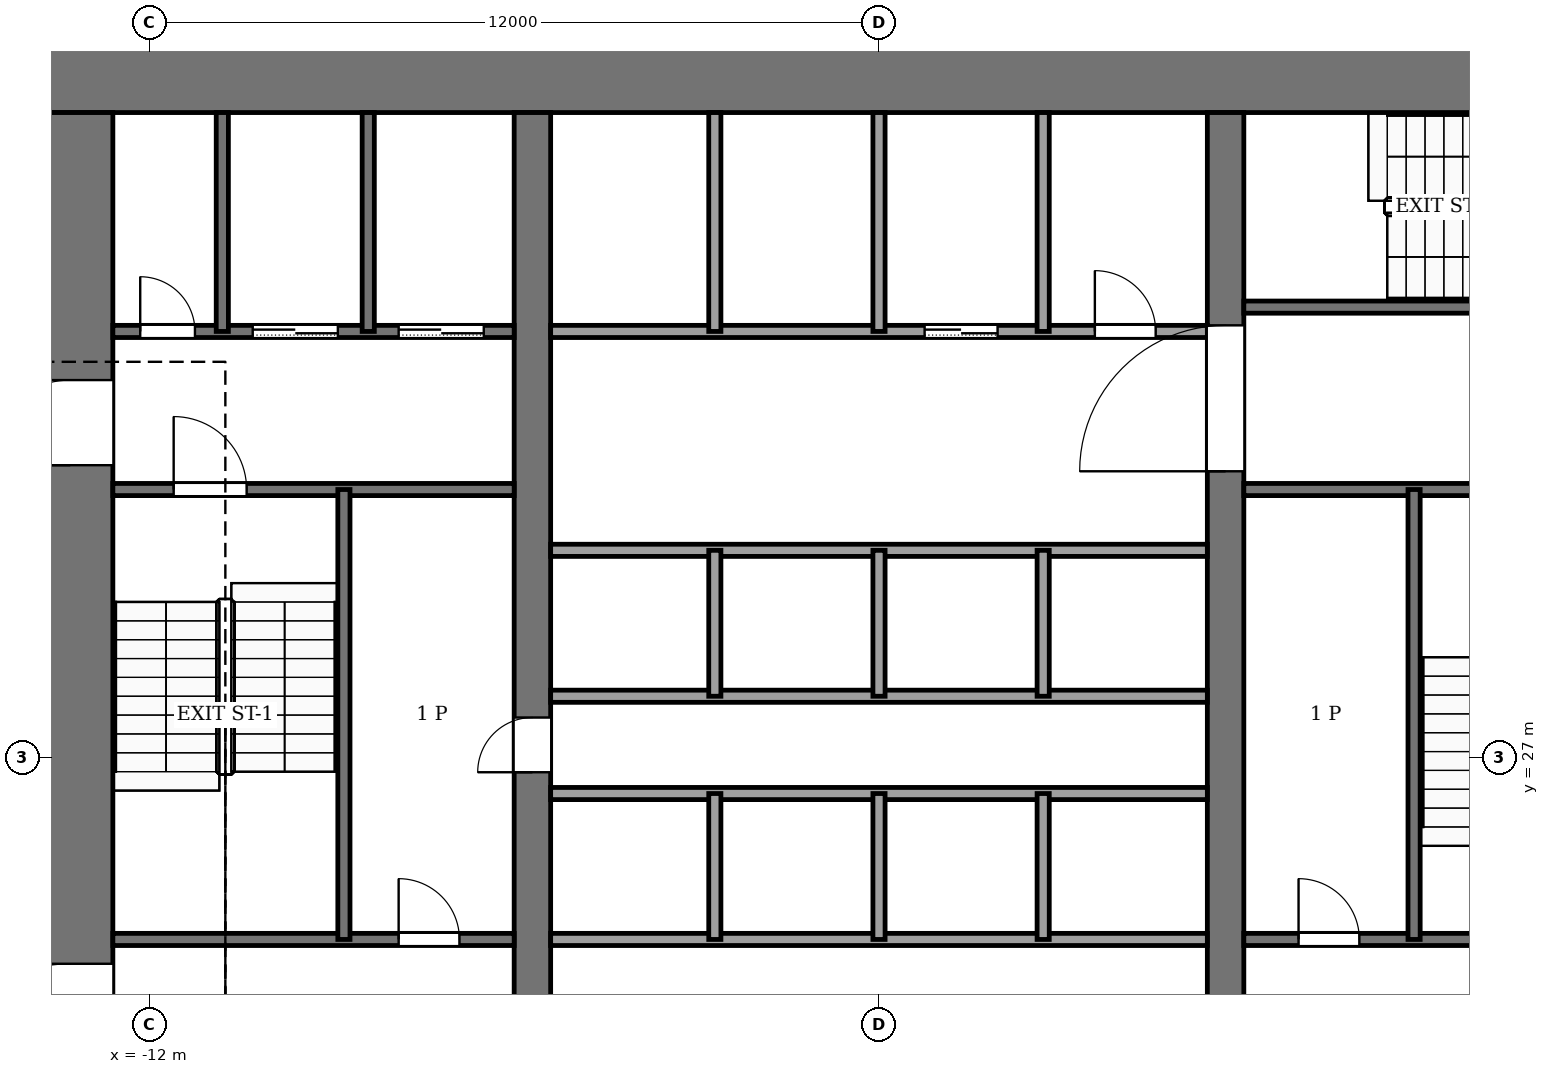
"""IFC4 building model, lengths in metres.
Left out: names, types, materials, properties, quantities, classifications, styles, units other than length and angle.
Written with IfcOpenShell. Run it as: python <this file> out.ifc"""

import sys

from ifc_helpers import new_model, si_unit, direction, frame, frame_2d, origin, place, context, subcontext, project, spatial, rectangle, extrude, element, fill, save


model = new_model("IFC4")
c1 = context("Model", 3, precision=1e-05, world=origin(), true_north=direction((0.0, 1.0)))
c2 = subcontext(c1, "Body", "Model", "MODEL_VIEW")
j1 = project(units=[si_unit("LENGTHUNIT", "METRE"), si_unit("PLANEANGLEUNIT", "RADIAN")], contexts=[c1])
p1 = place(None, origin())
s1 = spatial("IfcSite", under=j1, at=p1, CompositionType="ELEMENT")
p2 = place(p1, origin())
s2 = spatial("IfcBuilding", under=s1, at=p2, CompositionType="ELEMENT")
p3 = place(p2, frame((0.0, 0.0, 58.0)))
s3 = spatial("IfcBuildingStorey", under=s2, at=p3, CompositionType="ELEMENT", Elevation=58.0)
p4 = place(p3, frame((-14.0, 38.3, -0.25), z_axis=(0.0, 0.0, 1.0), x_axis=(1.0, 0.0, 0.0)))
e1 = element("IfcWall", 1, at=p4, inside=s3, PredefinedType="SHEAR", context=c2, shape_type="SweptSolid", body=[
    extrude(rectangle(XDim=28.0, YDim=1.4, at=frame_2d((14.0, 0.0))), origin(), (0.0, 0.0, 1.0), 7.12),
])
p5 = place(p3, frame((-13.3, 18.4, -0.25), z_axis=(0.0, 0.0, 1.0), x_axis=(0.0, 1.0, 0.0)))
e2 = element("IfcWall", 2, at=p5, inside=s3, PredefinedType="SHEAR", context=c2, shape_type="SweptSolid", body=[
    extrude(rectangle(XDim=19.2, YDim=1.4, at=frame_2d((9.6, 0.0))), origin(), (0.0, 0.0, 1.0), 7.12),
])
p6 = place(p5, frame((2.8, 0.0, 0.25)))
e3 = element("IfcOpeningElement", 3, at=p6, cuts=e2, PredefinedType="OPENING", context=c2, shape_type="SweptSolid", body=[
    extrude(rectangle(XDim=2.4, YDim=2.4, at=frame_2d((1.2, 1.2))), frame((0.0, 0.71, 0.0), z_axis=(0.0, -1.0, 0.0), x_axis=(1.0, 0.0, 0.0)), (0.0, 0.0, 1.0), 1.42),
])
p7 = place(p5, frame((13.4, 0.0, 0.25)))
e4 = element("IfcOpeningElement", 4, at=p7, cuts=e2, PredefinedType="OPENING", context=c2, shape_type="SweptSolid", body=[
    extrude(rectangle(XDim=1.4, YDim=2.2, at=frame_2d((0.7, 1.1))), frame((0.0, 0.71, 0.0), z_axis=(0.0, -1.0, 0.0), x_axis=(1.0, 0.0, 0.0)), (0.0, 0.0, 1.0), 1.42),
])
p8 = place(p3, frame((-5.7, 18.4, -0.25), z_axis=(0.0, 0.0, 1.0), x_axis=(0.0, 1.0, 0.0)))
e5 = element("IfcWall", 5, at=p8, inside=s3, PredefinedType="SHEAR", context=c2, shape_type="SweptSolid", body=[
    extrude(rectangle(XDim=19.2, YDim=0.6, at=frame_2d((9.6, 0.0))), origin(), (0.0, 0.0, 1.0), 7.12),
])
p9 = place(p8, frame((8.35, 0.0, 0.25)))
e6 = element("IfcOpeningElement", 6, at=p9, cuts=e5, PredefinedType="OPENING", context=c2, shape_type="SweptSolid", body=[
    extrude(rectangle(XDim=0.9, YDim=2.1, at=frame_2d((0.45, 1.05))), frame((0.0, 0.31, 0.0), z_axis=(0.0, -1.0, 0.0), x_axis=(1.0, 0.0, 0.0)), (0.0, 0.0, 1.0), 0.62),
])
p10 = place(p3, frame((5.7, 18.4, -0.25), z_axis=(0.0, 0.0, 1.0), x_axis=(0.0, 1.0, 0.0)))
e7 = element("IfcWall", 7, at=p10, inside=s3, PredefinedType="SHEAR", context=c2, shape_type="SweptSolid", body=[
    extrude(rectangle(XDim=19.2, YDim=0.6, at=frame_2d((9.6, 0.0))), origin(), (0.0, 0.0, 1.0), 7.12),
])
p11 = place(p10, frame((13.3, 0.0, 0.25)))
e8 = element("IfcOpeningElement", 8, at=p11, cuts=e7, PredefinedType="OPENING", context=c2, shape_type="SweptSolid", body=[
    extrude(rectangle(XDim=2.4, YDim=2.4, at=frame_2d((1.2, 1.2))), frame((0.0, 0.31, 0.0), z_axis=(0.0, -1.0, 0.0), x_axis=(1.0, 0.0, 0.0)), (0.0, 0.0, 1.0), 0.62),
])
p12 = place(p3, frame((-12.6, 24.0, 0.0), z_axis=(0.0, 0.0, 1.0), x_axis=(1.0, 0.0, 0.0)))
e9 = element("IfcWall", 9, at=p12, inside=s3, PredefinedType="PARTITIONING", context=c2, shape_type="SweptSolid", body=[
    extrude(rectangle(XDim=6.6, YDim=0.2, at=frame_2d((3.3, 0.0))), origin(), (0.0, 0.0, 1.0), 6.87),
])
p13 = place(p12, frame((4.7, 0.0, 0.0)))
e10 = element("IfcOpeningElement", 10, at=p13, cuts=e9, PredefinedType="OPENING", context=c2, shape_type="SweptSolid", body=[
    extrude(rectangle(XDim=1.0, YDim=2.1, at=frame_2d((0.5, 1.05))), frame((0.0, 0.11, 0.0), z_axis=(0.0, -1.0, 0.0), x_axis=(1.0, 0.0, 0.0)), (0.0, 0.0, 1.0), 0.22),
])
p14 = place(p3, frame((-5.4, 24.0, 0.0), z_axis=(0.0, 0.0, 1.0), x_axis=(1.0, 0.0, 0.0)))
e11 = element("IfcWall", 11, at=p14, inside=s3, PredefinedType="PARTITIONING", context=c2, shape_type="SweptSolid", body=[
    extrude(rectangle(XDim=10.8, YDim=0.2, at=frame_2d((5.4, 0.0))), origin(), (0.0, 0.0, 1.0), 6.87),
])
p15 = place(p3, frame((6.0, 24.0, 0.0), z_axis=(0.0, 0.0, 1.0), x_axis=(1.0, 0.0, 0.0)))
e12 = element("IfcWall", 12, at=p15, inside=s3, PredefinedType="PARTITIONING", context=c2, shape_type="SweptSolid", body=[
    extrude(rectangle(XDim=6.6, YDim=0.2, at=frame_2d((3.3, 0.0))), origin(), (0.0, 0.0, 1.0), 6.87),
])
p16 = place(p15, frame((0.9, 0.0, 0.0)))
e13 = element("IfcOpeningElement", 13, at=p16, cuts=e12, PredefinedType="OPENING", context=c2, shape_type="SweptSolid", body=[
    extrude(rectangle(XDim=1.0, YDim=2.1, at=frame_2d((0.5, 1.05))), frame((0.0, 0.11, 0.0), z_axis=(0.0, -1.0, 0.0), x_axis=(1.0, 0.0, 0.0)), (0.0, 0.0, 1.0), 0.22),
])
p17 = place(p15, frame((4.4, 0.0, 0.0)))
e14 = element("IfcOpeningElement", 14, at=p17, cuts=e12, PredefinedType="OPENING", context=c2, shape_type="SweptSolid", body=[
    extrude(rectangle(XDim=1.2, YDim=2.2, at=frame_2d((0.6, 1.1))), frame((0.0, 0.11, 0.0), z_axis=(0.0, -1.0, 0.0), x_axis=(1.0, 0.0, 0.0)), (0.0, 0.0, 1.0), 0.22),
])
for number, where, z_axis, x_axis in (
    (15, (-5.4, 26.4, 0.0), (0.0, 0.0, 1.0), (1.0, 0.0, 0.0)),
    (16, (-5.4, 28.0, 0.0), (0.0, 0.0, 1.0), (1.0, 0.0, 0.0)),
    (17, (-5.4, 30.4, 0.0), (0.0, 0.0, 1.0), (1.0, 0.0, 0.0)),
):
    element("IfcWall", number, at=place(p3, frame(where, z_axis=z_axis, x_axis=x_axis)), inside=s3, PredefinedType="PARTITIONING", context=c2, shape_type="SweptSolid", body=[
        extrude(rectangle(XDim=10.8, YDim=0.2, at=frame_2d((5.4, 0.0))), origin(), (0.0, 0.0, 1.0), 6.87),
    ])
p18 = place(p3, frame((-12.6, 31.4, 0.0), z_axis=(0.0, 0.0, 1.0), x_axis=(1.0, 0.0, 0.0)))
e18 = element("IfcWall", 18, at=p18, inside=s3, PredefinedType="PARTITIONING", context=c2, shape_type="SweptSolid", body=[
    extrude(rectangle(XDim=6.6, YDim=0.2, at=frame_2d((3.3, 0.0))), origin(), (0.0, 0.0, 1.0), 6.87),
])
p19 = place(p18, frame((1.0, 0.0, 0.0)))
e19 = element("IfcOpeningElement", 19, at=p19, cuts=e18, PredefinedType="OPENING", context=c2, shape_type="SweptSolid", body=[
    extrude(rectangle(XDim=1.2, YDim=2.2, at=frame_2d((0.6, 1.1))), frame((0.0, 0.11, 0.0), z_axis=(0.0, -1.0, 0.0), x_axis=(1.0, 0.0, 0.0)), (0.0, 0.0, 1.0), 0.22),
])
p20 = place(p3, frame((6.0, 31.4, 0.0), z_axis=(0.0, 0.0, 1.0), x_axis=(1.0, 0.0, 0.0)))
e20 = element("IfcWall", 20, at=p20, inside=s3, PredefinedType="PARTITIONING", context=c2, shape_type="SweptSolid", body=[
    extrude(rectangle(XDim=6.6, YDim=0.2, at=frame_2d((3.3, 0.0))), origin(), (0.0, 0.0, 1.0), 6.87),
])
p21 = place(p3, frame((-12.6, 34.0, 0.0), z_axis=(0.0, 0.0, 1.0), x_axis=(1.0, 0.0, 0.0)))
e21 = element("IfcWall", 21, at=p21, inside=s3, PredefinedType="PARTITIONING", context=c2, shape_type="SweptSolid", body=[
    extrude(rectangle(XDim=6.6, YDim=0.2, at=frame_2d((3.3, 0.0))), origin(), (0.0, 0.0, 1.0), 6.87),
])
p22 = place(p21, frame((4.7, 0.0, 0.0)))
e22 = element("IfcOpeningElement", 22, at=p22, cuts=e21, PredefinedType="OPENING", context=c2, shape_type="SweptSolid", body=[
    extrude(rectangle(XDim=1.4, YDim=2.2, at=frame_2d((0.7, 1.1))), frame((0.0, 0.11, 0.0), z_axis=(0.0, -1.0, 0.0), x_axis=(1.0, 0.0, 0.0)), (0.0, 0.0, 1.0), 0.22),
])
p23 = place(p21, frame((2.3, 0.0, 0.0)))
e23 = element("IfcOpeningElement", 23, at=p23, cuts=e21, PredefinedType="OPENING", context=c2, shape_type="SweptSolid", body=[
    extrude(rectangle(XDim=1.4, YDim=2.2, at=frame_2d((0.7, 1.1))), frame((0.0, 0.11, 0.0), z_axis=(0.0, -1.0, 0.0), x_axis=(1.0, 0.0, 0.0)), (0.0, 0.0, 1.0), 0.22),
])
p24 = place(p21, frame((0.45, 0.0, 0.0)))
e24 = element("IfcOpeningElement", 24, at=p24, cuts=e21, PredefinedType="OPENING", context=c2, shape_type="SweptSolid", body=[
    extrude(rectangle(XDim=0.9, YDim=2.1, at=frame_2d((0.45, 1.05))), frame((0.0, 0.11, 0.0), z_axis=(0.0, -1.0, 0.0), x_axis=(1.0, 0.0, 0.0)), (0.0, 0.0, 1.0), 0.22),
])
p25 = place(p3, frame((-5.4, 34.0, 0.0), z_axis=(0.0, 0.0, 1.0), x_axis=(1.0, 0.0, 0.0)))
e25 = element("IfcWall", 25, at=p25, inside=s3, PredefinedType="PARTITIONING", context=c2, shape_type="SweptSolid", body=[
    extrude(rectangle(XDim=10.8, YDim=0.2, at=frame_2d((5.4, 0.0))), origin(), (0.0, 0.0, 1.0), 6.87),
])
p26 = place(p25, frame((6.15, 0.0, 0.0)))
e26 = element("IfcOpeningElement", 26, at=p26, cuts=e25, PredefinedType="OPENING", context=c2, shape_type="SweptSolid", body=[
    extrude(rectangle(XDim=1.2, YDim=2.2, at=frame_2d((0.6, 1.1))), frame((0.0, 0.11, 0.0), z_axis=(0.0, -1.0, 0.0), x_axis=(1.0, 0.0, 0.0)), (0.0, 0.0, 1.0), 0.22),
])
p27 = place(p25, frame((8.95, 0.0, 0.0)))
e27 = element("IfcOpeningElement", 27, at=p27, cuts=e25, PredefinedType="OPENING", context=c2, shape_type="SweptSolid", body=[
    extrude(rectangle(XDim=1.0, YDim=2.1, at=frame_2d((0.5, 1.05))), frame((0.0, 0.11, 0.0), z_axis=(0.0, -1.0, 0.0), x_axis=(1.0, 0.0, 0.0)), (0.0, 0.0, 1.0), 0.22),
])
p28 = place(p3, frame((6.0, 34.4, 0.0), z_axis=(0.0, 0.0, 1.0), x_axis=(1.0, 0.0, 0.0)))
e28 = element("IfcWall", 28, at=p28, inside=s3, PredefinedType="PARTITIONING", context=c2, shape_type="SweptSolid", body=[
    extrude(rectangle(XDim=6.6, YDim=0.2, at=frame_2d((3.3, 0.0))), origin(), (0.0, 0.0, 1.0), 6.87),
])
p29 = place(p28, frame((4.8, 0.0, 0.0)))
e29 = element("IfcOpeningElement", 29, at=p29, cuts=e28, PredefinedType="OPENING", context=c2, shape_type="SweptSolid", body=[
    extrude(rectangle(XDim=1.2, YDim=2.2, at=frame_2d((0.6, 1.1))), frame((0.0, 0.11, 0.0), z_axis=(0.0, -1.0, 0.0), x_axis=(1.0, 0.0, 0.0)), (0.0, 0.0, 1.0), 0.22),
])
p30 = place(p3, frame((-10.8, 34.0, 0.0), z_axis=(0.0, 0.0, 1.0), x_axis=(0.0, 1.0, 0.0)))
e30 = element("IfcWall", 30, at=p30, inside=s3, PredefinedType="PARTITIONING", context=c2, shape_type="SweptSolid", body=[
    extrude(rectangle(XDim=3.6, YDim=0.2, at=frame_2d((1.8, 0.0))), origin(), (0.0, 0.0, 1.0), 6.87),
])
p31 = place(p3, frame((-8.8, 24.0, 0.0), z_axis=(0.0, 0.0, 1.0), x_axis=(0.0, 1.0, 0.0)))
e31 = element("IfcWall", 31, at=p31, inside=s3, PredefinedType="PARTITIONING", context=c2, shape_type="SweptSolid", body=[
    extrude(rectangle(XDim=7.4, YDim=0.2, at=frame_2d((3.7, 0.0))), origin(), (0.0, 0.0, 1.0), 6.87),
])
p32 = place(p3, frame((-8.4, 34.0, 0.0), z_axis=(0.0, 0.0, 1.0), x_axis=(0.0, 1.0, 0.0)))
e32 = element("IfcWall", 32, at=p32, inside=s3, PredefinedType="PARTITIONING", context=c2, shape_type="SweptSolid", body=[
    extrude(rectangle(XDim=3.6, YDim=0.2, at=frame_2d((1.8, 0.0))), origin(), (0.0, 0.0, 1.0), 6.87),
])
for number, where, z_axis, x_axis in (
    (33, (-2.7, 24.0, 0.0), (0.0, 0.0, 1.0), (0.0, 1.0, 0.0)),
    (34, (-2.7, 28.0, 0.0), (0.0, 0.0, 1.0), (0.0, 1.0, 0.0)),
):
    element("IfcWall", number, at=place(p3, frame(where, z_axis=z_axis, x_axis=x_axis)), inside=s3, PredefinedType="PARTITIONING", context=c2, shape_type="SweptSolid", body=[
        extrude(rectangle(XDim=2.4, YDim=0.2, at=frame_2d((1.2, 0.0))), origin(), (0.0, 0.0, 1.0), 6.87),
    ])
p33 = place(p3, frame((-2.7, 34.0, 0.0), z_axis=(0.0, 0.0, 1.0), x_axis=(0.0, 1.0, 0.0)))
e35 = element("IfcWall", 35, at=p33, inside=s3, PredefinedType="PARTITIONING", context=c2, shape_type="SweptSolid", body=[
    extrude(rectangle(XDim=3.6, YDim=0.2, at=frame_2d((1.8, 0.0))), origin(), (0.0, 0.0, 1.0), 6.87),
])
for number, where, z_axis, x_axis in (
    (36, (0.0, 24.0, 0.0), (0.0, 0.0, 1.0), (0.0, 1.0, 0.0)),
    (37, (0.0, 28.0, 0.0), (0.0, 0.0, 1.0), (0.0, 1.0, 0.0)),
):
    element("IfcWall", number, at=place(p3, frame(where, z_axis=z_axis, x_axis=x_axis)), inside=s3, PredefinedType="PARTITIONING", context=c2, shape_type="SweptSolid", body=[
        extrude(rectangle(XDim=2.4, YDim=0.2, at=frame_2d((1.2, 0.0))), origin(), (0.0, 0.0, 1.0), 6.87),
    ])
p34 = place(p3, frame((0.0, 34.0, 0.0), z_axis=(0.0, 0.0, 1.0), x_axis=(0.0, 1.0, 0.0)))
e38 = element("IfcWall", 38, at=p34, inside=s3, PredefinedType="PARTITIONING", context=c2, shape_type="SweptSolid", body=[
    extrude(rectangle(XDim=3.6, YDim=0.2, at=frame_2d((1.8, 0.0))), origin(), (0.0, 0.0, 1.0), 6.87),
])
for number, where, z_axis, x_axis in (
    (39, (2.7, 24.0, 0.0), (0.0, 0.0, 1.0), (0.0, 1.0, 0.0)),
    (40, (2.7, 28.0, 0.0), (0.0, 0.0, 1.0), (0.0, 1.0, 0.0)),
):
    element("IfcWall", number, at=place(p3, frame(where, z_axis=z_axis, x_axis=x_axis)), inside=s3, PredefinedType="PARTITIONING", context=c2, shape_type="SweptSolid", body=[
        extrude(rectangle(XDim=2.4, YDim=0.2, at=frame_2d((1.2, 0.0))), origin(), (0.0, 0.0, 1.0), 6.87),
    ])
p35 = place(p3, frame((2.7, 34.0, 0.0), z_axis=(0.0, 0.0, 1.0), x_axis=(0.0, 1.0, 0.0)))
e41 = element("IfcWall", 41, at=p35, inside=s3, PredefinedType="PARTITIONING", context=c2, shape_type="SweptSolid", body=[
    extrude(rectangle(XDim=3.6, YDim=0.2, at=frame_2d((1.8, 0.0))), origin(), (0.0, 0.0, 1.0), 6.87),
])
p36 = place(p3, frame((8.8, 24.0, 0.0), z_axis=(0.0, 0.0, 1.0), x_axis=(0.0, 1.0, 0.0)))
e42 = element("IfcWall", 42, at=p36, inside=s3, PredefinedType="PARTITIONING", context=c2, shape_type="SweptSolid", body=[
    extrude(rectangle(XDim=7.4, YDim=0.2, at=frame_2d((3.7, 0.0))), origin(), (0.0, 0.0, 1.0), 6.87),
])
p37 = place(p26, origin())
e43 = element("IfcDoor", 43, at=p37, inside=s3, OperationType="SLIDING_TO_LEFT", PredefinedType="DOOR", context=c2, shape_type="SweptSolid", body=[
    extrude(rectangle(XDim=1.2, YDim=2.2, at=frame_2d((0.6, 1.1))), frame((0.0, 0.025, 0.0), z_axis=(0.0, -1.0, 0.0), x_axis=(1.0, 0.0, 0.0)), (0.0, 0.0, 1.0), 0.05),
])
fill(e26, e43)
p38 = place(p22, origin())
e44 = element("IfcDoor", 44, at=p38, inside=s3, OperationType="SLIDING_TO_LEFT", PredefinedType="DOOR", context=c2, shape_type="SweptSolid", body=[
    extrude(rectangle(XDim=1.4, YDim=2.2, at=frame_2d((0.7, 1.1))), frame((0.0, 0.025, 0.0), z_axis=(0.0, -1.0, 0.0), x_axis=(1.0, 0.0, 0.0)), (0.0, 0.0, 1.0), 0.05),
])
fill(e22, e44)
p39 = place(p23, origin())
e45 = element("IfcDoor", 45, at=p39, inside=s3, OperationType="SLIDING_TO_LEFT", PredefinedType="DOOR", context=c2, shape_type="SweptSolid", body=[
    extrude(rectangle(XDim=1.4, YDim=2.2, at=frame_2d((0.7, 1.1))), frame((0.0, 0.025, 0.0), z_axis=(0.0, -1.0, 0.0), x_axis=(1.0, 0.0, 0.0)), (0.0, 0.0, 1.0), 0.05),
])
fill(e23, e45)
p40 = place(p24, origin())
e46 = element("IfcDoor", 46, at=p40, inside=s3, OperationType="SINGLE_SWING_RIGHT", PredefinedType="DOOR", context=c2, shape_type="SweptSolid", body=[
    extrude(rectangle(XDim=0.9, YDim=2.1, at=frame_2d((0.45, 1.05))), frame((0.0, 0.025, 0.0), z_axis=(0.0, -1.0, 0.0), x_axis=(1.0, 0.0, 0.0)), (0.0, 0.0, 1.0), 0.05),
])
fill(e24, e46)
p41 = place(p13, origin())
e47 = element("IfcDoor", 47, at=p41, inside=s3, OperationType="SINGLE_SWING_RIGHT", PredefinedType="DOOR", context=c2, shape_type="SweptSolid", body=[
    extrude(rectangle(XDim=1.0, YDim=2.1, at=frame_2d((0.5, 1.05))), frame((0.0, 0.025, 0.0), z_axis=(0.0, -1.0, 0.0), x_axis=(1.0, 0.0, 0.0)), (0.0, 0.0, 1.0), 0.05),
])
fill(e10, e47)
p42 = place(p16, origin())
e48 = element("IfcDoor", 48, at=p42, inside=s3, OperationType="SINGLE_SWING_LEFT", PredefinedType="DOOR", context=c2, shape_type="SweptSolid", body=[
    extrude(rectangle(XDim=1.0, YDim=2.1, at=frame_2d((0.5, 1.05))), frame((0.0, 0.025, 0.0), z_axis=(0.0, -1.0, 0.0), x_axis=(1.0, 0.0, 0.0)), (0.0, 0.0, 1.0), 0.05),
])
fill(e13, e48)
p43 = place(p27, origin())
e49 = element("IfcDoor", 49, at=p43, inside=s3, OperationType="SINGLE_SWING_LEFT", PredefinedType="DOOR", context=c2, shape_type="SweptSolid", body=[
    extrude(rectangle(XDim=1.0, YDim=2.1, at=frame_2d((0.5, 1.05))), frame((0.0, 0.025, 0.0), z_axis=(0.0, -1.0, 0.0), x_axis=(1.0, 0.0, 0.0)), (0.0, 0.0, 1.0), 0.05),
])
fill(e27, e49)
p44 = place(p9, origin())
e50 = element("IfcDoor", 50, at=p44, inside=s3, OperationType="SINGLE_SWING_RIGHT", PredefinedType="DOOR", context=c2, shape_type="SweptSolid", body=[
    extrude(rectangle(XDim=0.9, YDim=2.1, at=frame_2d((0.45, 1.05))), frame((0.0, 0.025, 0.0), z_axis=(0.0, -1.0, 0.0), x_axis=(1.0, 0.0, 0.0)), (0.0, 0.0, 1.0), 0.05),
])
fill(e6, e50)
p45 = place(p19, origin())
e51 = element("IfcDoor", 51, at=p45, inside=s3, OperationType="SINGLE_SWING_RIGHT", PredefinedType="DOOR", context=c2, shape_type="SweptSolid", body=[
    extrude(rectangle(XDim=1.2, YDim=2.2, at=frame_2d((0.6, 1.1))), frame((0.0, 0.025, 0.0), z_axis=(0.0, -1.0, 0.0), x_axis=(1.0, 0.0, 0.0)), (0.0, 0.0, 1.0), 0.05),
])
fill(e19, e51)
p46 = place(p11, origin())
e52 = element("IfcDoor", 52, at=p46, inside=s3, OperationType="DOUBLE_DOOR_SINGLE_SWING", PredefinedType="DOOR", context=c2, shape_type="SweptSolid", body=[
    extrude(rectangle(XDim=2.4, YDim=2.4, at=frame_2d((1.2, 1.2))), frame((0.0, 0.025, 0.0), z_axis=(0.0, -1.0, 0.0), x_axis=(1.0, 0.0, 0.0)), (0.0, 0.0, 1.0), 0.05),
])
fill(e8, e52)
p47 = place(p6, origin())
e53 = element("IfcDoor", 53, at=p47, inside=s3, OperationType="DOUBLE_DOOR_SINGLE_SWING", PredefinedType="DOOR", context=c2, shape_type="SweptSolid", body=[
    extrude(rectangle(XDim=2.4, YDim=2.4, at=frame_2d((1.2, 1.2))), frame((0.0, 0.025, 0.0), z_axis=(0.0, -1.0, 0.0), x_axis=(1.0, 0.0, 0.0)), (0.0, 0.0, 1.0), 0.05),
])
fill(e3, e53)
p48 = place(p7, origin())
e54 = element("IfcDoor", 54, at=p48, inside=s3, OperationType="SINGLE_SWING_RIGHT", PredefinedType="DOOR", context=c2, shape_type="SweptSolid", body=[
    extrude(rectangle(XDim=1.4, YDim=2.2, at=frame_2d((0.7, 1.1))), frame((0.0, 0.025, 0.0), z_axis=(0.0, -1.0, 0.0), x_axis=(1.0, 0.0, 0.0)), (0.0, 0.0, 1.0), 0.05),
])
fill(e4, e54)
save(model, sys.argv[1])
